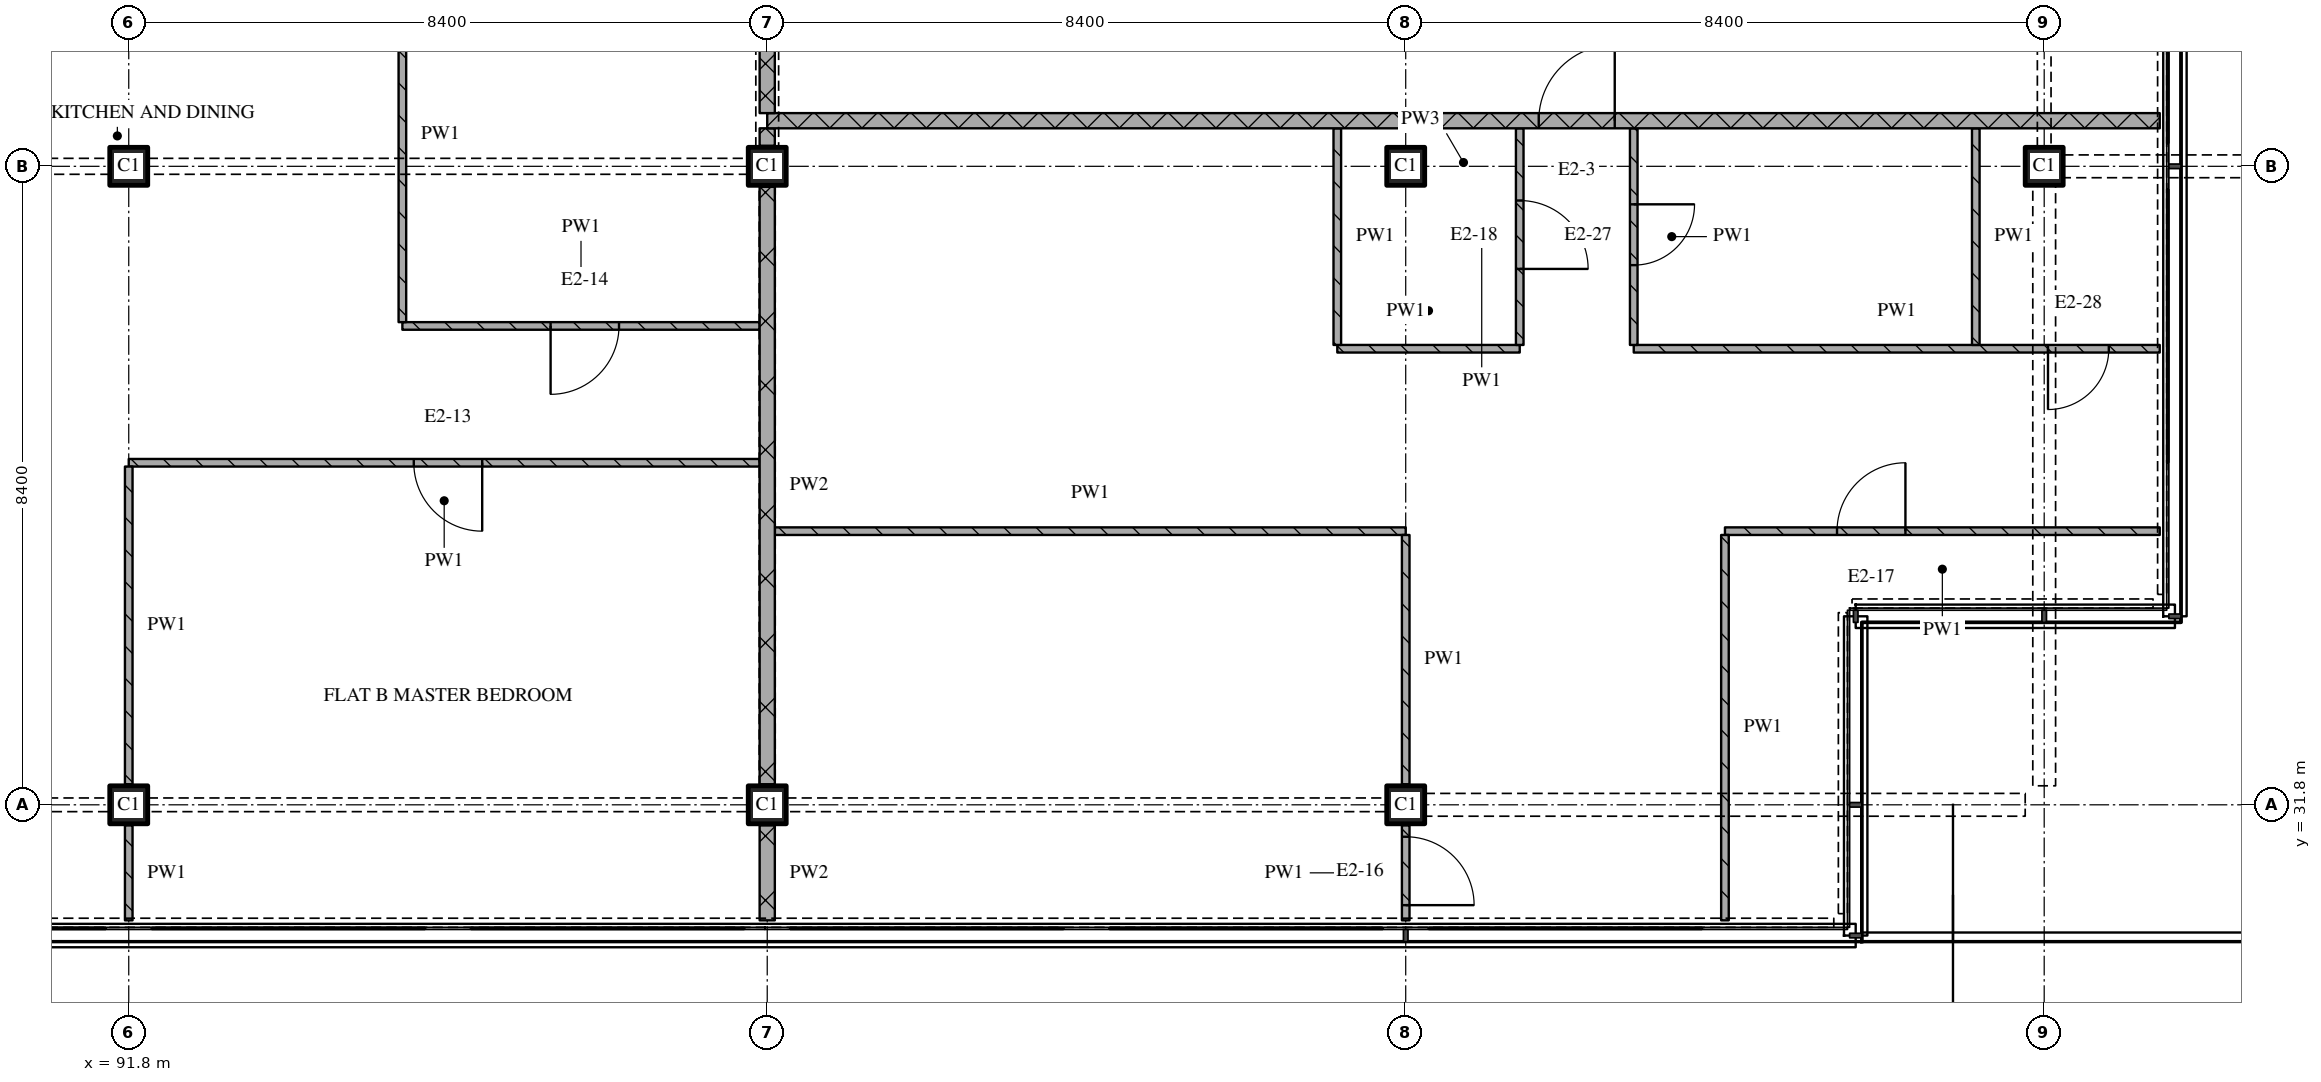
"""IFC4 building model, lengths in metres.
Left out: names, types, materials, properties, quantities, classifications, styles, units other than length and angle.
Written with IfcOpenShell. Run it as: python <this file> out.ifc"""

import sys

from ifc_helpers import new_model, si_unit, direction, frame, frame_2d, origin, origin_2d, place, context, subcontext, project, spatial, rectangle, extrude, element, fill, save


model = new_model("IFC4")
c1 = context("Model", 3, precision=1e-05, world=origin(), true_north=direction((0.0, 1.0)))
c2 = subcontext(c1, "Body", "Model", "MODEL_VIEW")
j1 = project(units=[si_unit("LENGTHUNIT", "METRE"), si_unit("PLANEANGLEUNIT", "RADIAN")], contexts=[c1])
p1 = place(None, origin())
s1 = spatial("IfcSite", under=j1, at=p1, CompositionType="ELEMENT")
p2 = place(p1, origin())
s2 = spatial("IfcBuilding", under=s1, at=p2, CompositionType="ELEMENT")
p3 = place(p2, frame((0.0, 0.0, 270.75)))
s3 = spatial("IfcBuildingStorey", under=s2, at=p3, CompositionType="ELEMENT", Elevation=270.75)
for number, where, z_axis, x_axis in (
    (1, (91.8, 31.8, 0.0), (0.0, 0.0, 1.0), (1.0, 0.0, 0.0)),
    (2, (91.8, 40.2, 0.0), (0.0, 0.0, 1.0), (1.0, 0.0, 0.0)),
    (3, (100.2, 31.8, 0.0), (0.0, 0.0, 1.0), (1.0, 0.0, 0.0)),
    (4, (100.2, 40.2, 0.0), (0.0, 0.0, 1.0), (1.0, 0.0, 0.0)),
    (5, (108.6, 31.8, 0.0), (0.0, 0.0, 1.0), (1.0, 0.0, 0.0)),
    (6, (108.6, 40.2, 0.0), (0.0, 0.0, 1.0), (1.0, 0.0, 0.0)),
    (7, (117.0, 40.2, 0.0), (0.0, 0.0, 1.0), (1.0, 0.0, 0.0)),
):
    element("IfcColumn", number, at=place(p3, frame(where, z_axis=z_axis, x_axis=x_axis)), inside=s3, PredefinedType="COLUMN", context=c2, shape_type="SweptSolid", body=[
        extrude(rectangle(XDim=0.5, YDim=0.5, at=origin_2d()), origin(), (0.0, 0.0, 1.0), 3.6),
    ])
p4 = place(p3, frame((100.3, 35.4, 0.0), z_axis=(0.0, 0.0, 1.0), x_axis=(1.0, 0.0, 0.0)))
e8 = element("IfcWall", 8, at=p4, inside=s3, PredefinedType="PARTITIONING", context=c2, shape_type="SweptSolid", body=[
    extrude(rectangle(XDim=8.3, YDim=0.1, at=frame_2d((4.15, 0.0))), origin(), (0.0, 0.0, 1.0), 3.32),
])
p5 = place(p3, frame((118.52, 35.4, 0.0), z_axis=(0.0, 0.0, 1.0), x_axis=(-1.0, 0.0, 0.0)))
e9 = element("IfcWall", 9, at=p5, inside=s3, PredefinedType="PARTITIONING", context=c2, shape_type="SweptSolid", body=[
    extrude(rectangle(XDim=5.72, YDim=0.1, at=frame_2d((2.86, 0.0))), origin(), (0.0, 0.0, 1.0), 3.32),
])
p6 = place(p5, frame((3.346, 0.0, 0.0)))
e10 = element("IfcOpeningElement", 10, at=p6, cuts=e9, PredefinedType="OPENING", context=c2, shape_type="SweptSolid", body=[
    extrude(rectangle(XDim=0.9, YDim=2.1, at=frame_2d((0.45, 1.05))), frame((0.0, 0.06, 0.0), z_axis=(0.0, -1.0, 0.0), x_axis=(1.0, 0.0, 0.0)), (0.0, 0.0, 1.0), 0.12),
])
p7 = place(p3, frame((100.1, 36.3, 0.0), z_axis=(0.0, 0.0, 1.0), x_axis=(-1.0, 0.0, 0.0)))
e11 = element("IfcWall", 11, at=p7, inside=s3, PredefinedType="PARTITIONING", context=c2, shape_type="SweptSolid", body=[
    extrude(rectangle(XDim=8.3, YDim=0.1, at=frame_2d((4.15, 0.0))), origin(), (0.0, 0.0, 1.0), 3.32),
])
p8 = place(p7, frame((3.65, 0.0, 0.0)))
e12 = element("IfcOpeningElement", 12, at=p8, cuts=e11, PredefinedType="OPENING", context=c2, shape_type="SweptSolid", body=[
    extrude(rectangle(XDim=0.9, YDim=2.1, at=frame_2d((0.45, 1.05))), frame((0.0, 0.06, 0.0), z_axis=(0.0, -1.0, 0.0), x_axis=(1.0, 0.0, 0.0)), (0.0, 0.0, 1.0), 0.12),
])
p9 = place(p3, frame((107.7, 37.8, 0.0), z_axis=(0.0, 0.0, 1.0), x_axis=(1.0, 0.0, 0.0)))
e13 = element("IfcWall", 13, at=p9, inside=s3, PredefinedType="PARTITIONING", context=c2, shape_type="SweptSolid", body=[
    extrude(rectangle(XDim=2.4, YDim=0.1, at=frame_2d((1.2, 0.0))), origin(), (0.0, 0.0, 1.0), 3.32),
])
p10 = place(p3, frame((111.6, 37.8, 0.0), z_axis=(0.0, 0.0, 1.0), x_axis=(1.0, 0.0, 0.0)))
e14 = element("IfcWall", 14, at=p10, inside=s3, PredefinedType="PARTITIONING", context=c2, shape_type="SweptSolid", body=[
    extrude(rectangle(XDim=6.92, YDim=0.1, at=frame_2d((3.46, 0.0))), origin(), (0.0, 0.0, 1.0), 3.32),
])
p11 = place(p10, frame((5.45, 0.0, 0.0)))
e15 = element("IfcOpeningElement", 15, at=p11, cuts=e14, PredefinedType="OPENING", context=c2, shape_type="SweptSolid", body=[
    extrude(rectangle(XDim=0.8, YDim=2.1, at=frame_2d((0.4, 1.05))), frame((0.0, 0.06, 0.0), z_axis=(0.0, -1.0, 0.0), x_axis=(1.0, 0.0, 0.0)), (0.0, 0.0, 1.0), 0.12),
])
p12 = place(p3, frame((95.4, 38.1, 0.0), z_axis=(0.0, 0.0, 1.0), x_axis=(1.0, 0.0, 0.0)))
e16 = element("IfcWall", 16, at=p12, inside=s3, PredefinedType="PARTITIONING", context=c2, shape_type="SweptSolid", body=[
    extrude(rectangle(XDim=4.7, YDim=0.1, at=frame_2d((2.35, 0.0))), origin(), (0.0, 0.0, 1.0), 3.32),
])
p13 = place(p12, frame((1.95, 0.0, 0.0)))
e17 = element("IfcOpeningElement", 17, at=p13, cuts=e16, PredefinedType="OPENING", context=c2, shape_type="SweptSolid", body=[
    extrude(rectangle(XDim=0.9, YDim=2.1, at=frame_2d((0.45, 1.05))), frame((0.0, 0.06, 0.0), z_axis=(0.0, -1.0, 0.0), x_axis=(1.0, 0.0, 0.0)), (0.0, 0.0, 1.0), 0.12),
])
p14 = place(p3, frame((118.52, 40.8, 0.0), z_axis=(0.0, 0.0, 1.0), x_axis=(-1.0, 0.0, 0.0)))
e18 = element("IfcWall", 18, at=p14, inside=s3, PredefinedType="PARTITIONING", context=c2, shape_type="SweptSolid", body=[
    extrude(rectangle(XDim=18.32, YDim=0.2, at=frame_2d((9.16, 0.0))), origin(), (0.0, 0.0, 1.0), 3.32),
])
p15 = place(p14, frame((7.17, 0.0, 0.0)))
e19 = element("IfcOpeningElement", 19, at=p15, cuts=e18, PredefinedType="OPENING", context=c2, shape_type="SweptSolid", body=[
    extrude(rectangle(XDim=1.0, YDim=2.1, at=frame_2d((0.5, 1.05))), frame((0.0, 0.11, 0.0), z_axis=(0.0, -1.0, 0.0), x_axis=(1.0, 0.0, 0.0)), (0.0, 0.0, 1.0), 0.22),
])
p16 = place(p3, frame((91.8, 31.53, 0.0), z_axis=(0.0, 0.0, 1.0), x_axis=(0.0, -1.0, 0.0)))
e20 = element("IfcWall", 20, at=p16, inside=s3, PredefinedType="PARTITIONING", context=c2, shape_type="SweptSolid", body=[
    extrude(rectangle(XDim=1.25, YDim=0.1, at=frame_2d((0.625, 0.0))), origin(), (0.0, 0.0, 1.0), 3.32),
])
p17 = place(p3, frame((91.8, 36.25, 0.0), z_axis=(0.0, 0.0, 1.0), x_axis=(0.0, -1.0, 0.0)))
e21 = element("IfcWall", 21, at=p17, inside=s3, PredefinedType="PARTITIONING", context=c2, shape_type="SweptSolid", body=[
    extrude(rectangle(XDim=4.18, YDim=0.1, at=frame_2d((2.09, 0.0))), origin(), (0.0, 0.0, 1.0), 3.32),
])
p18 = place(p3, frame((95.4, 43.1, 0.0), z_axis=(0.0, 0.0, 1.0), x_axis=(0.0, -1.0, 0.0)))
e22 = element("IfcWall", 22, at=p18, inside=s3, PredefinedType="PARTITIONING", context=c2, shape_type="SweptSolid", body=[
    extrude(rectangle(XDim=4.95, YDim=0.1, at=frame_2d((2.475, 0.0))), origin(), (0.0, 0.0, 1.0), 3.32),
])
p19 = place(p3, frame((100.2, 43.1, 0.0), z_axis=(0.0, 0.0, 1.0), x_axis=(0.0, -1.0, 0.0)))
e23 = element("IfcWall", 23, at=p19, inside=s3, PredefinedType="PARTITIONING", context=c2, shape_type="SweptSolid", body=[
    extrude(rectangle(XDim=2.2, YDim=0.2, at=frame_2d((1.1, 0.0))), origin(), (0.0, 0.0, 1.0), 2.53),
])
p20 = place(p3, frame((100.2, 31.53, 0.0), z_axis=(0.0, 0.0, 1.0), x_axis=(0.0, -1.0, 0.0)))
e24 = element("IfcWall", 24, at=p20, inside=s3, PredefinedType="PARTITIONING", context=c2, shape_type="SweptSolid", body=[
    extrude(rectangle(XDim=1.25, YDim=0.2, at=frame_2d((0.625, 0.0))), origin(), (0.0, 0.0, 1.0), 3.32),
])
p21 = place(p3, frame((100.2, 39.93, 0.0), z_axis=(0.0, 0.0, 1.0), x_axis=(0.0, -1.0, 0.0)))
e25 = element("IfcWall", 25, at=p21, inside=s3, PredefinedType="PARTITIONING", context=c2, shape_type="SweptSolid", body=[
    extrude(rectangle(XDim=7.86, YDim=0.2, at=frame_2d((3.93, 0.0))), origin(), (0.0, 0.0, 1.0), 2.77),
])
p22 = place(p3, frame((100.2, 40.7, 0.0), z_axis=(0.0, 0.0, 1.0), x_axis=(0.0, -1.0, 0.0)))
e26 = element("IfcWall", 26, at=p22, inside=s3, PredefinedType="PARTITIONING", context=c2, shape_type="SweptSolid", body=[
    extrude(rectangle(XDim=0.23, YDim=0.2, at=frame_2d((0.115, 0.0))), origin(), (0.0, 0.0, 1.0), 3.32),
])
p23 = place(p3, frame((107.7, 40.7, 0.0), z_axis=(0.0, 0.0, 1.0), x_axis=(0.0, -1.0, 0.0)))
e27 = element("IfcWall", 27, at=p23, inside=s3, PredefinedType="PARTITIONING", context=c2, shape_type="SweptSolid", body=[
    extrude(rectangle(XDim=2.85, YDim=0.1, at=frame_2d((1.425, 0.0))), origin(), (0.0, 0.0, 1.0), 3.32),
])
p24 = place(p3, frame((108.6, 30.28, 0.0), z_axis=(0.0, 0.0, 1.0), x_axis=(0.0, 1.0, 0.0)))
e28 = element("IfcWall", 28, at=p24, inside=s3, PredefinedType="PARTITIONING", context=c2, shape_type="SweptSolid", body=[
    extrude(rectangle(XDim=1.25, YDim=0.1, at=frame_2d((0.625, 0.0))), origin(), (0.0, 0.0, 1.0), 3.32),
])
p25 = place(p24, frame((0.2, 0.0, 0.0)))
e29 = element("IfcOpeningElement", 29, at=p25, cuts=e28, PredefinedType="OPENING", context=c2, shape_type="SweptSolid", body=[
    extrude(rectangle(XDim=0.9, YDim=2.1, at=frame_2d((0.45, 1.05))), frame((0.0, 0.06, 0.0), z_axis=(0.0, -1.0, 0.0), x_axis=(1.0, 0.0, 0.0)), (0.0, 0.0, 1.0), 0.12),
])
p26 = place(p3, frame((108.6, 35.35, 0.0), z_axis=(0.0, 0.0, 1.0), x_axis=(0.0, -1.0, 0.0)))
e30 = element("IfcWall", 30, at=p26, inside=s3, PredefinedType="PARTITIONING", context=c2, shape_type="SweptSolid", body=[
    extrude(rectangle(XDim=3.28, YDim=0.1, at=frame_2d((1.64, 0.0))), origin(), (0.0, 0.0, 1.0), 3.32),
])
p27 = place(p3, frame((110.1, 37.85, 0.0), z_axis=(0.0, 0.0, 1.0), x_axis=(0.0, 1.0, 0.0)))
e31 = element("IfcWall", 31, at=p27, inside=s3, PredefinedType="PARTITIONING", context=c2, shape_type="SweptSolid", body=[
    extrude(rectangle(XDim=2.85, YDim=0.1, at=frame_2d((1.425, 0.0))), origin(), (0.0, 0.0, 1.0), 3.32),
])
p28 = place(p27, frame((1.0, 0.0, 0.0)))
e32 = element("IfcOpeningElement", 32, at=p28, cuts=e31, PredefinedType="OPENING", context=c2, shape_type="SweptSolid", body=[
    extrude(rectangle(XDim=0.9, YDim=2.1, at=frame_2d((0.45, 1.05))), frame((0.0, 0.06, 0.0), z_axis=(0.0, -1.0, 0.0), x_axis=(1.0, 0.0, 0.0)), (0.0, 0.0, 1.0), 0.12),
])
p29 = place(p3, frame((111.6, 40.7, 0.0), z_axis=(0.0, 0.0, 1.0), x_axis=(0.0, -1.0, 0.0)))
e33 = element("IfcWall", 33, at=p29, inside=s3, PredefinedType="PARTITIONING", context=c2, shape_type="SweptSolid", body=[
    extrude(rectangle(XDim=2.85, YDim=0.1, at=frame_2d((1.425, 0.0))), origin(), (0.0, 0.0, 1.0), 3.32),
])
p30 = place(p29, frame((1.0, 0.0, 0.0)))
e34 = element("IfcOpeningElement", 34, at=p30, cuts=e33, PredefinedType="OPENING", context=c2, shape_type="SweptSolid", body=[
    extrude(rectangle(XDim=0.8, YDim=2.1, at=frame_2d((0.4, 1.05))), frame((0.0, 0.06, 0.0), z_axis=(0.0, -1.0, 0.0), x_axis=(1.0, 0.0, 0.0)), (0.0, 0.0, 1.0), 0.12),
])
p31 = place(p3, frame((112.8, 35.35, 0.0), z_axis=(0.0, 0.0, 1.0), x_axis=(0.0, -1.0, 0.0)))
e35 = element("IfcWall", 35, at=p31, inside=s3, PredefinedType="PARTITIONING", context=c2, shape_type="SweptSolid", body=[
    extrude(rectangle(XDim=5.07, YDim=0.1, at=frame_2d((2.535, 0.0))), origin(), (0.0, 0.0, 1.0), 3.32),
])
p32 = place(p3, frame((116.1, 40.7, 0.0), z_axis=(0.0, 0.0, 1.0), x_axis=(0.0, -1.0, 0.0)))
e36 = element("IfcWall", 36, at=p32, inside=s3, PredefinedType="PARTITIONING", context=c2, shape_type="SweptSolid", body=[
    extrude(rectangle(XDim=2.85, YDim=0.1, at=frame_2d((1.425, 0.0))), origin(), (0.0, 0.0, 1.0), 3.32),
])
p33 = place(p6, origin())
e37 = element("IfcDoor", 37, at=p33, inside=s3, OperationType="SINGLE_SWING_RIGHT", PredefinedType="DOOR", context=c2, shape_type="SweptSolid", body=[
    extrude(rectangle(XDim=0.9, YDim=2.1, at=frame_2d((0.45, 1.05))), frame((0.0, 0.025, 0.0), z_axis=(0.0, -1.0, 0.0), x_axis=(1.0, 0.0, 0.0)), (0.0, 0.0, 1.0), 0.05),
])
fill(e10, e37)
p34 = place(p8, origin())
e38 = element("IfcDoor", 38, at=p34, inside=s3, OperationType="SINGLE_SWING_LEFT", PredefinedType="DOOR", context=c2, shape_type="SweptSolid", body=[
    extrude(rectangle(XDim=0.9, YDim=2.1, at=frame_2d((0.45, 1.05))), frame((0.0, 0.025, 0.0), z_axis=(0.0, -1.0, 0.0), x_axis=(1.0, 0.0, 0.0)), (0.0, 0.0, 1.0), 0.05),
])
fill(e12, e38)
p35 = place(p11, origin())
e39 = element("IfcDoor", 39, at=p35, inside=s3, OperationType="SINGLE_SWING_RIGHT", PredefinedType="DOOR", context=c2, shape_type="SweptSolid", body=[
    extrude(rectangle(XDim=0.8, YDim=2.1, at=frame_2d((0.4, 1.05))), frame((0.0, 0.025, 0.0), z_axis=(0.0, -1.0, 0.0), x_axis=(1.0, 0.0, 0.0)), (0.0, 0.0, 1.0), 0.05),
])
fill(e15, e39)
p36 = place(p13, origin())
e40 = element("IfcDoor", 40, at=p36, inside=s3, OperationType="SINGLE_SWING_RIGHT", PredefinedType="DOOR", context=c2, shape_type="SweptSolid", body=[
    extrude(rectangle(XDim=0.9, YDim=2.1, at=frame_2d((0.45, 1.05))), frame((0.0, 0.025, 0.0), z_axis=(0.0, -1.0, 0.0), x_axis=(1.0, 0.0, 0.0)), (0.0, 0.0, 1.0), 0.05),
])
fill(e17, e40)
p37 = place(p15, origin())
e41 = element("IfcDoor", 41, at=p37, inside=s3, OperationType="SINGLE_SWING_RIGHT", PredefinedType="DOOR", context=c2, shape_type="SweptSolid", body=[
    extrude(rectangle(XDim=1.0, YDim=2.1, at=frame_2d((0.5, 1.05))), frame((0.0, 0.025, 0.0), z_axis=(0.0, -1.0, 0.0), x_axis=(1.0, 0.0, 0.0)), (0.0, 0.0, 1.0), 0.05),
])
fill(e19, e41)
p38 = place(p25, origin())
e42 = element("IfcDoor", 42, at=p38, inside=s3, OperationType="SINGLE_SWING_RIGHT", PredefinedType="DOOR", context=c2, shape_type="SweptSolid", body=[
    extrude(rectangle(XDim=0.9, YDim=2.1, at=frame_2d((0.45, 1.05))), frame((0.0, 0.025, 0.0), z_axis=(0.0, -1.0, 0.0), x_axis=(1.0, 0.0, 0.0)), (0.0, 0.0, 1.0), 0.05),
])
fill(e29, e42)
p39 = place(p28, origin())
e43 = element("IfcDoor", 43, at=p39, inside=s3, OperationType="SINGLE_SWING_RIGHT", PredefinedType="DOOR", context=c2, shape_type="SweptSolid", body=[
    extrude(rectangle(XDim=0.9, YDim=2.1, at=frame_2d((0.45, 1.05))), frame((0.0, 0.025, 0.0), z_axis=(0.0, -1.0, 0.0), x_axis=(1.0, 0.0, 0.0)), (0.0, 0.0, 1.0), 0.05),
])
fill(e32, e43)
p40 = place(p30, origin())
e44 = element("IfcDoor", 44, at=p40, inside=s3, OperationType="SINGLE_SWING_LEFT", PredefinedType="DOOR", context=c2, shape_type="SweptSolid", body=[
    extrude(rectangle(XDim=0.8, YDim=2.1, at=frame_2d((0.4, 1.05))), frame((0.0, 0.025, 0.0), z_axis=(0.0, -1.0, 0.0), x_axis=(1.0, 0.0, 0.0)), (0.0, 0.0, 1.0), 0.05),
])
fill(e34, e44)
save(model, sys.argv[1])
